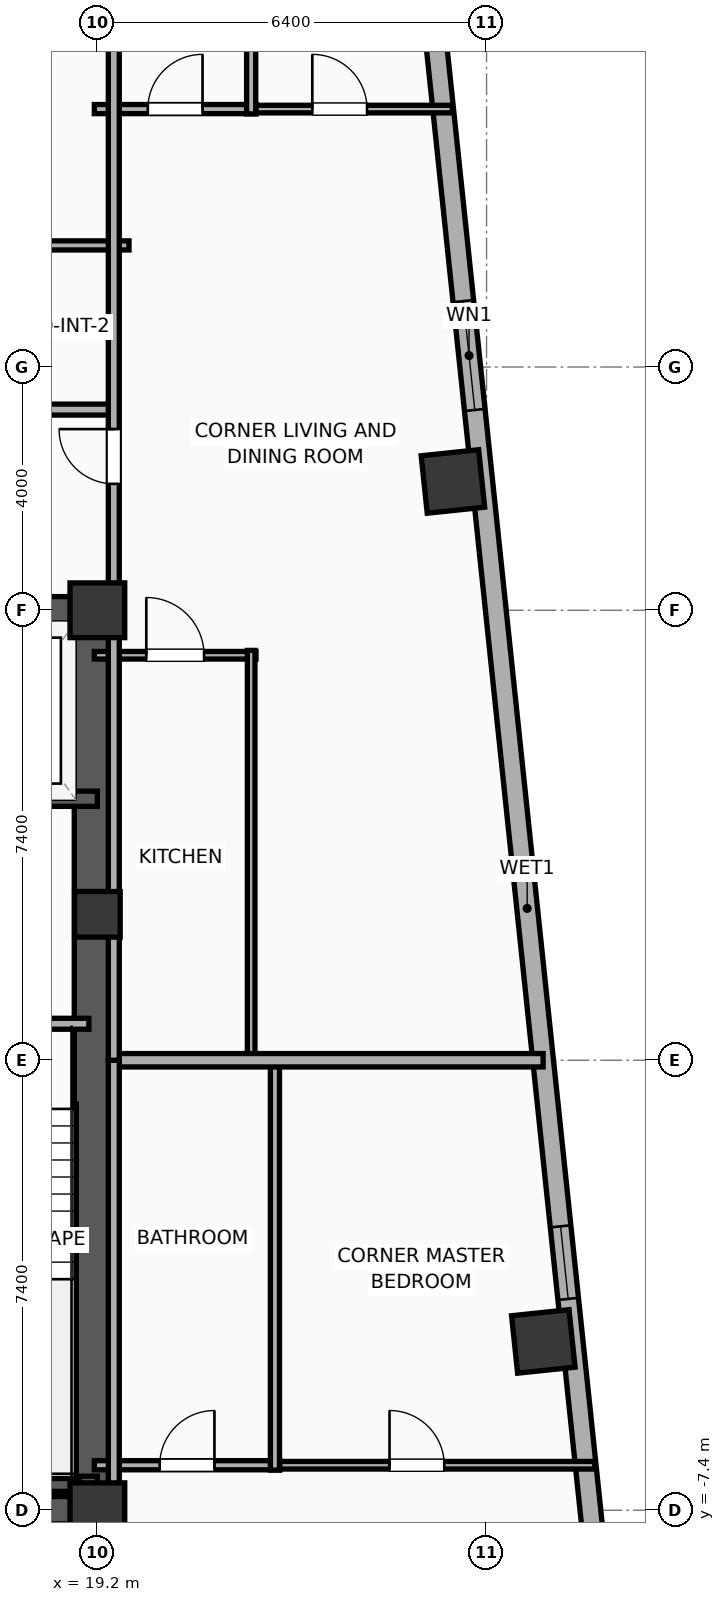
"""IFC4 building model, lengths in metres.
Left out: names, types, materials, properties, quantities, classifications, styles, units other than length and angle.
Written with IfcOpenShell. Run it as: python <this file> out.ifc"""

import sys

from ifc_helpers import new_model, si_unit, direction, frame, frame_2d, origin, origin_2d, place, context, subcontext, project, spatial, rectangle, hollow_rectangle, extrude, element, fill, save


model = new_model("IFC4")
c1 = context("Model", 3, precision=1e-05, world=origin(), true_north=direction((0.0, 1.0)))
c2 = subcontext(c1, "Body", "Model", "MODEL_VIEW")
j1 = project(units=[si_unit("LENGTHUNIT", "METRE"), si_unit("PLANEANGLEUNIT", "RADIAN")], contexts=[c1])
p1 = place(None, origin())
s1 = spatial("IfcSite", under=j1, at=p1, CompositionType="ELEMENT")
p2 = place(p1, origin())
s2 = spatial("IfcBuilding", under=s1, at=p2, CompositionType="ELEMENT")
p3 = place(p2, frame((0.0, 0.0, 148.2)))
s3 = spatial("IfcBuildingStorey", under=s2, at=p3, CompositionType="ELEMENT", Elevation=148.2)
p4 = place(p3, frame((19.2, -7.4, 0.0), z_axis=(0.0, 0.0, 1.0), x_axis=(1.0, 0.0, 0.0)))
e1 = element("IfcColumn", 1, at=p4, inside=s3, PredefinedType="COLUMN", context=c2, shape_type="SweptSolid", body=[
    extrude(rectangle(XDim=0.9, YDim=0.9, at=origin_2d()), origin(), (0.0, 0.0, 1.0), 3.9),
])
p5 = place(p3, frame((19.2, 2.4, 0.0), z_axis=(0.0, 0.0, 1.0), x_axis=(1.0, 0.0, 0.0)))
e2 = element("IfcColumn", 2, at=p5, inside=s3, PredefinedType="COLUMN", context=c2, shape_type="SweptSolid", body=[
    extrude(rectangle(XDim=0.75, YDim=0.75, at=origin_2d()), origin(), (0.0, 0.0, 1.0), 3.9),
])
p6 = place(p3, frame((19.2, 7.4, 0.0), z_axis=(0.0, 0.0, 1.0), x_axis=(1.0, 0.0, 0.0)))
e3 = element("IfcColumn", 3, at=p6, inside=s3, PredefinedType="COLUMN", context=c2, shape_type="SweptSolid", body=[
    extrude(rectangle(XDim=0.9, YDim=0.9, at=origin_2d()), origin(), (0.0, 0.0, 1.0), 3.9),
])
for number, where, z_axis, x_axis in (
    (4, (12.175, -7.4, 0.0), (0.0, 0.0, 1.0), (1.0, 0.0, 0.0)),
    (5, (12.175, 7.4, 0.0), (0.0, 0.0, 1.0), (1.0, 0.0, 0.0)),
):
    element("IfcWall", number, at=place(p3, frame(where, z_axis=z_axis, x_axis=x_axis)), inside=s3, PredefinedType="SHEAR", context=c2, shape_type="SweptSolid", body=[
        extrude(rectangle(XDim=7.25, YDim=0.45, at=frame_2d((3.625, 0.0))), origin(), (0.0, 0.0, 1.0), 3.65),
    ])
p7 = place(p3, frame((19.145, -7.4, 0.0), z_axis=(0.0, 0.0, 1.0), x_axis=(0.0, 1.0, 0.0)))
e6 = element("IfcWall", 6, at=p7, inside=s3, PredefinedType="SHEAR", context=c2, shape_type="SweptSolid", body=[
    extrude(rectangle(XDim=14.8, YDim=0.65, at=frame_2d((7.4, 0.0))), origin(), (0.0, 0.0, 1.0), 3.65),
])
p8 = place(p3, frame((15.74, -6.965, 0.0), z_axis=(0.0, 0.0, 1.0), x_axis=(1.0, 0.0, 0.0)))
e7 = element("IfcWall", 7, at=p8, inside=s3, PredefinedType="SOLIDWALL", context=c2, shape_type="SweptSolid", body=[
    extrude(rectangle(XDim=3.46, YDim=0.25, at=frame_2d((1.73, 0.0))), origin(), (0.0, 0.0, 1.0), 3.65),
])
for number, where, z_axis, x_axis in (
    (8, (26.533, -4.624, 0.0), (0.0, 0.0, 1.0), (0.995, 0.105, 0.0)),
    (9, (25.047, 9.518, 0.0), (0.0, 0.0, 1.0), (0.995, 0.105, 0.0)),
):
    element("IfcColumn", number, at=place(p3, frame(where, z_axis=z_axis, x_axis=x_axis)), inside=s3, PredefinedType="COLUMN", context=c2, shape_type="SweptSolid", body=[
        extrude(hollow_rectangle(XDim=0.95, YDim=0.95, WallThickness=0.032, at=origin_2d()), origin(), (0.0, 0.0, 1.0), 3.9),
    ])
p9 = place(p3, frame((24.534, 18.99, 0.0), z_axis=(0.0, 0.0, 1.0), x_axis=(0.104534959766, -0.994521212537, 0.0)))
e10 = element("IfcWall", 10, at=p9, inside=s3, PredefinedType="ELEMENTEDWALL", context=c2, shape_type="SweptSolid", body=[
    extrude(rectangle(XDim=33.166, YDim=0.34, at=frame_2d((16.583, 0.0))), origin(), (0.0, 0.0, 1.0), 3.65),
])
p10 = place(p9, frame((6.542, 0.0, 0.75)))
e11 = element("IfcOpeningElement", 11, at=p10, cuts=e10, PredefinedType="OPENING", context=c2, shape_type="SweptSolid", body=[
    extrude(rectangle(XDim=1.8, YDim=2.1, at=frame_2d((0.9, 1.05))), frame((0.0, 0.18, 0.0), z_axis=(0.0, -1.0, 0.0), x_axis=(1.0, 0.0, 0.0)), (0.0, 0.0, 1.0), 0.36),
])
p11 = place(p9, frame((21.84, 0.0, 0.75)))
e12 = element("IfcOpeningElement", 12, at=p11, cuts=e10, PredefinedType="OPENING", context=c2, shape_type="SweptSolid", body=[
    extrude(rectangle(XDim=1.2, YDim=2.05, at=frame_2d((0.6, 1.025))), frame((0.0, 0.18, 0.0), z_axis=(0.0, -1.0, 0.0), x_axis=(1.0, 0.0, 0.0)), (0.0, 0.0, 1.0), 0.36),
])
p12 = place(p3, frame((16.6, 4.3, 0.0), z_axis=(0.0, 0.0, 1.0), x_axis=(1.0, 0.0, 0.0)))
e13 = element("IfcWall", 13, at=p12, inside=s3, PredefinedType="SOLIDWALL", context=c2, shape_type="SweptSolid", body=[
    extrude(rectangle(XDim=2.6, YDim=0.25, at=frame_2d((1.3, 0.0))), origin(), (0.0, 0.0, 1.0), 3.65),
])
p13 = place(p3, frame((15.7, 0.6, 0.0), z_axis=(0.0, 0.0, 1.0), x_axis=(1.0, 0.0, 0.0)))
e14 = element("IfcWall", 14, at=p13, inside=s3, PredefinedType="PARTITIONING", context=c2, shape_type="SweptSolid", body=[
    extrude(rectangle(XDim=3.36, YDim=0.18, at=frame_2d((1.68, 0.0))), origin(), (0.0, 0.0, 1.0), 3.65),
])
p14 = place(p13, frame((1.155, 0.0, 0.0)))
e15 = element("IfcOpeningElement", 15, at=p14, cuts=e14, PredefinedType="OPENING", context=c2, shape_type="SweptSolid", body=[
    extrude(rectangle(XDim=1.05, YDim=2.05, at=frame_2d((0.525, 1.025))), frame((0.0, 0.1, 0.0), z_axis=(0.0, -1.0, 0.0), x_axis=(1.0, 0.0, 0.0)), (0.0, 0.0, 1.0), 0.2),
])
p15 = place(p3, frame((17.136, 13.4, 0.0), z_axis=(0.0, 0.0, 1.0), x_axis=(1.0, 0.0, 0.0)))
e16 = element("IfcWall", 16, at=p15, inside=s3, PredefinedType="PLUMBINGWALL", context=c2, shape_type="SweptSolid", body=[
    extrude(rectangle(XDim=2.584, YDim=0.15, at=frame_2d((1.292, 0.0))), origin(), (0.0, 0.0, 1.0), 3.65),
])
p16 = place(p3, frame((8.08, 10.7, 0.0), z_axis=(0.0, 0.0, 1.0), x_axis=(1.0, 0.0, 0.0)))
e17 = element("IfcWall", 17, at=p16, inside=s3, PredefinedType="PARTITIONING", context=c2, shape_type="SweptSolid", body=[
    extrude(rectangle(XDim=11.42, YDim=0.18, at=frame_2d((5.71, 0.0))), origin(), (0.0, 0.0, 1.0), 3.65),
])
p17 = place(p16, frame((2.562, 0.0, 0.0)))
e18 = element("IfcOpeningElement", 18, at=p17, cuts=e17, PredefinedType="OPENING", context=c2, shape_type="SweptSolid", body=[
    extrude(rectangle(XDim=0.9, YDim=2.05, at=frame_2d((0.45, 1.025))), frame((0.0, 0.1, 0.0), z_axis=(0.0, -1.0, 0.0), x_axis=(1.0, 0.0, 0.0)), (0.0, 0.0, 1.0), 0.2),
])
p18 = place(p16, frame((6.853, 0.0, 0.0)))
e19 = element("IfcOpeningElement", 19, at=p18, cuts=e17, PredefinedType="OPENING", context=c2, shape_type="SweptSolid", body=[
    extrude(rectangle(XDim=1.15, YDim=2.05, at=frame_2d((0.575, 1.025))), frame((0.0, 0.1, 0.0), z_axis=(0.0, -1.0, 0.0), x_axis=(1.0, 0.0, 0.0)), (0.0, 0.0, 1.0), 0.2),
])
p19 = place(p3, frame((22.06, -6.66, 0.0), z_axis=(0.0, 0.0, 1.0), x_axis=(1.0, 0.0, 0.0)))
e20 = element("IfcWall", 20, at=p19, inside=s3, PredefinedType="PARTITIONING", context=c2, shape_type="SweptSolid", body=[
    extrude(rectangle(XDim=5.321, YDim=0.125, at=frame_2d((2.661, 0.0))), origin(), (0.0, 0.0, 1.0), 3.65),
])
p20 = place(p19, frame((1.945, 0.0, 0.0)))
e21 = element("IfcOpeningElement", 21, at=p20, cuts=e20, PredefinedType="OPENING", context=c2, shape_type="SweptSolid", body=[
    extrude(rectangle(XDim=0.9, YDim=2.05, at=frame_2d((0.45, 1.025))), frame((0.0, 0.073, 0.0), z_axis=(0.0, -1.0, 0.0), x_axis=(1.0, 0.0, 0.0)), (0.0, 0.0, 1.0), 0.145),
])
p21 = place(p3, frame((19.15, -6.66, 0.0), z_axis=(0.0, 0.0, 1.0), x_axis=(1.0, 0.0, 0.0)))
e22 = element("IfcWall", 22, at=p21, inside=s3, PredefinedType="PLUMBINGWALL", context=c2, shape_type="SweptSolid", body=[
    extrude(rectangle(XDim=3.05, YDim=0.15, at=frame_2d((1.525, 0.0))), origin(), (0.0, 0.0, 1.0), 3.04),
])
p22 = place(p21, frame((1.075, 0.0, 0.0)))
e23 = element("IfcOpeningElement", 23, at=p22, cuts=e22, PredefinedType="OPENING", context=c2, shape_type="SweptSolid", body=[
    extrude(rectangle(XDim=0.9, YDim=2.05, at=frame_2d((0.45, 1.025))), frame((0.0, 0.085, 0.0), z_axis=(0.0, -1.0, 0.0), x_axis=(1.0, 0.0, 0.0)), (0.0, 0.0, 1.0), 0.17),
])
p23 = place(p3, frame((22.12, -6.74, 0.0), z_axis=(0.0, 0.0, 1.0), x_axis=(0.0, 1.0, 0.0)))
e24 = element("IfcWall", 24, at=p23, inside=s3, PredefinedType="PLUMBINGWALL", context=c2, shape_type="SweptSolid", body=[
    extrude(rectangle(XDim=6.72, YDim=0.15, at=frame_2d((3.36, 0.0))), origin(), (0.0, 0.0, 1.0), 3.65),
])
p24 = place(p3, frame((21.669, 15.642, 0.0), z_axis=(0.0, 0.0, 1.0), x_axis=(1.0, 0.0, 0.0)))
e25 = element("IfcWall", 25, at=p24, inside=s3, PredefinedType="PARTITIONING", context=c2, shape_type="SweptSolid", body=[
    extrude(rectangle(XDim=3.368, YDim=0.125, at=frame_2d((1.684, 0.0))), origin(), (0.0, 0.0, 1.0), 3.65),
])
p25 = place(p24, frame((1.066, 0.0, 0.0)))
e26 = element("IfcOpeningElement", 26, at=p25, cuts=e25, PredefinedType="OPENING", context=c2, shape_type="SweptSolid", body=[
    extrude(rectangle(XDim=0.9, YDim=2.05, at=frame_2d((0.45, 1.025))), frame((0.0, 0.073, 0.0), z_axis=(0.0, -1.0, 0.0), x_axis=(1.0, 0.0, 0.0)), (0.0, 0.0, 1.0), 0.145),
])
p26 = place(p3, frame((19.15, 6.66, 0.0), z_axis=(0.0, 0.0, 1.0), x_axis=(1.0, 0.0, 0.0)))
e27 = element("IfcWall", 27, at=p26, inside=s3, PredefinedType="PARTITIONING", context=c2, shape_type="SweptSolid", body=[
    extrude(rectangle(XDim=2.659, YDim=0.125, at=frame_2d((1.33, 0.0))), origin(), (0.0, 0.0, 1.0), 3.65),
])
p27 = place(p26, frame((0.854, 0.0, 0.0)))
e28 = element("IfcOpeningElement", 28, at=p27, cuts=e27, PredefinedType="OPENING", context=c2, shape_type="SweptSolid", body=[
    extrude(rectangle(XDim=0.95, YDim=2.05, at=frame_2d((0.475, 1.025))), frame((0.0, 0.073, 0.0), z_axis=(0.0, -1.0, 0.0), x_axis=(1.0, 0.0, 0.0)), (0.0, 0.0, 1.0), 0.145),
])
p28 = place(p3, frame((19.15, 15.642, 0.0), z_axis=(0.0, 0.0, 1.0), x_axis=(1.0, 0.0, 0.0)))
e29 = element("IfcWall", 29, at=p28, inside=s3, PredefinedType="PLUMBINGWALL", context=c2, shape_type="SweptSolid", body=[
    extrude(rectangle(XDim=2.659, YDim=0.15, at=frame_2d((1.33, 0.0))), origin(), (0.0, 0.0, 1.0), 3.65),
])
p29 = place(p28, frame((0.879, 0.0, 0.0)))
e30 = element("IfcOpeningElement", 30, at=p29, cuts=e29, PredefinedType="OPENING", context=c2, shape_type="SweptSolid", body=[
    extrude(rectangle(XDim=0.9, YDim=2.05, at=frame_2d((0.45, 1.025))), frame((0.0, 0.085, 0.0), z_axis=(0.0, -1.0, 0.0), x_axis=(1.0, 0.0, 0.0)), (0.0, 0.0, 1.0), 0.17),
])
p30 = place(p3, frame((21.729, 0.02, 0.0), z_axis=(0.0, 0.0, 1.0), x_axis=(0.0, 1.0, 0.0)))
e31 = element("IfcWall", 31, at=p30, inside=s3, PredefinedType="PARTITIONING", context=c2, shape_type="SweptSolid", body=[
    extrude(rectangle(XDim=6.72, YDim=0.125, at=frame_2d((3.36, 0.0))), origin(), (0.0, 0.0, 1.0), 3.65),
])
p31 = place(p3, frame((21.729, 15.562, 0.0), z_axis=(0.0, 0.0, 1.0), x_axis=(0.0, 1.0, 0.0)))
e32 = element("IfcWall", 32, at=p31, inside=s3, PredefinedType="PLUMBINGWALL", context=c2, shape_type="SweptSolid", body=[
    extrude(rectangle(XDim=6.713, YDim=0.15, at=frame_2d((3.357, 0.0))), origin(), (0.0, 0.0, 1.0), 3.04),
])
p32 = place(p3, frame((19.47, 0.0, 0.0), z_axis=(0.0, 0.0, 1.0), x_axis=(1.0, 0.0, 0.0)))
e33 = element("IfcWall", 33, at=p32, inside=s3, PredefinedType="PARTITIONING", context=c2, shape_type="SweptSolid", body=[
    extrude(rectangle(XDim=7.06, YDim=0.22, at=frame_2d((3.53, 0.0))), origin(), (0.0, 0.0, 1.0), 3.65),
])
p33 = place(p3, frame((19.47, -18.559, 0.0), z_axis=(0.0, 0.0, 1.0), x_axis=(0.0, 1.0, 0.0)))
e34 = element("IfcWall", 34, at=p33, inside=s3, PredefinedType="PARTITIONING", context=c2, shape_type="SweptSolid", body=[
    extrude(rectangle(XDim=18.559, YDim=0.18, at=frame_2d((9.279, 0.0))), origin(), (0.0, 0.0, 1.0), 3.65),
])
p34 = place(p33, frame((8.178, 0.0, 0.0)))
e35 = element("IfcOpeningElement", 35, at=p34, cuts=e34, PredefinedType="OPENING", context=c2, shape_type="SweptSolid", body=[
    extrude(rectangle(XDim=0.9, YDim=2.05, at=frame_2d((0.45, 1.025))), frame((0.0, 0.1, 0.0), z_axis=(0.0, -1.0, 0.0), x_axis=(1.0, 0.0, 0.0)), (0.0, 0.0, 1.0), 0.2),
])
p35 = place(p3, frame((19.47, 0.0, 0.0), z_axis=(0.0, 0.0, 1.0), x_axis=(0.0, 1.0, 0.0)))
e36 = element("IfcWall", 36, at=p35, inside=s3, PredefinedType="PARTITIONING", context=c2, shape_type="SweptSolid", body=[
    extrude(rectangle(XDim=22.124, YDim=0.18, at=frame_2d((11.062, 0.0))), origin(), (0.0, 0.0, 1.0), 3.04),
])
p36 = place(p35, frame((9.479, 0.0, 0.0)))
e37 = element("IfcOpeningElement", 37, at=p36, cuts=e36, PredefinedType="OPENING", context=c2, shape_type="SweptSolid", body=[
    extrude(rectangle(XDim=0.9, YDim=2.05, at=frame_2d((0.45, 1.025))), frame((0.0, 0.1, 0.0), z_axis=(0.0, -1.0, 0.0), x_axis=(1.0, 0.0, 0.0)), (0.0, 0.0, 1.0), 0.2),
])
p37 = place(p10, origin())
e38 = element("IfcWindow", 38, at=p37, inside=s3, PartitioningType="SINGLE_PANEL", PredefinedType="WINDOW", context=c2, shape_type="SweptSolid", body=[
    extrude(rectangle(XDim=1.8, YDim=2.1, at=frame_2d((0.9, 1.05))), frame((0.0, 0.03, 0.0), z_axis=(0.0, -1.0, 0.0), x_axis=(1.0, 0.0, 0.0)), (0.0, 0.0, 1.0), 0.06),
])
fill(e11, e38)
p38 = place(p11, origin())
e39 = element("IfcWindow", 39, at=p38, inside=s3, PartitioningType="SINGLE_PANEL", PredefinedType="WINDOW", context=c2, shape_type="SweptSolid", body=[
    extrude(rectangle(XDim=1.2, YDim=2.05, at=frame_2d((0.6, 1.025))), frame((0.0, 0.03, 0.0), z_axis=(0.0, -1.0, 0.0), x_axis=(1.0, 0.0, 0.0)), (0.0, 0.0, 1.0), 0.06),
])
fill(e12, e39)
p39 = place(p20, origin())
e40 = element("IfcDoor", 40, at=p39, inside=s3, OperationType="SINGLE_SWING_LEFT", PredefinedType="DOOR", context=c2, shape_type="SweptSolid", body=[
    extrude(rectangle(XDim=0.9, YDim=2.05, at=frame_2d((0.45, 1.025))), frame((0.0, 0.025, 0.0), z_axis=(0.0, -1.0, 0.0), x_axis=(1.0, 0.0, 0.0)), (0.0, 0.0, 1.0), 0.05),
])
fill(e21, e40)
p40 = place(p22, origin())
e41 = element("IfcDoor", 41, at=p40, inside=s3, OperationType="SINGLE_SWING_RIGHT", PredefinedType="DOOR", context=c2, shape_type="SweptSolid", body=[
    extrude(rectangle(XDim=0.9, YDim=2.05, at=frame_2d((0.45, 1.025))), frame((0.0, 0.025, 0.0), z_axis=(0.0, -1.0, 0.0), x_axis=(1.0, 0.0, 0.0)), (0.0, 0.0, 1.0), 0.05),
])
fill(e23, e41)
p41 = place(p25, origin())
e42 = element("IfcDoor", 42, at=p41, inside=s3, OperationType="SINGLE_SWING_LEFT", PredefinedType="DOOR", context=c2, shape_type="SweptSolid", body=[
    extrude(rectangle(XDim=0.9, YDim=2.05, at=frame_2d((0.45, 1.025))), frame((0.0, 0.025, 0.0), z_axis=(0.0, -1.0, 0.0), x_axis=(1.0, 0.0, 0.0)), (0.0, 0.0, 1.0), 0.05),
])
fill(e26, e42)
p42 = place(p27, origin())
e43 = element("IfcDoor", 43, at=p42, inside=s3, OperationType="SINGLE_SWING_LEFT", PredefinedType="DOOR", context=c2, shape_type="SweptSolid", body=[
    extrude(rectangle(XDim=0.95, YDim=2.05, at=frame_2d((0.475, 1.025))), frame((0.0, 0.025, 0.0), z_axis=(0.0, -1.0, 0.0), x_axis=(1.0, 0.0, 0.0)), (0.0, 0.0, 1.0), 0.05),
])
fill(e28, e43)
p43 = place(p29, origin())
e44 = element("IfcDoor", 44, at=p43, inside=s3, OperationType="SINGLE_SWING_RIGHT", PredefinedType="DOOR", context=c2, shape_type="SweptSolid", body=[
    extrude(rectangle(XDim=0.9, YDim=2.05, at=frame_2d((0.45, 1.025))), frame((0.0, 0.025, 0.0), z_axis=(0.0, -1.0, 0.0), x_axis=(1.0, 0.0, 0.0)), (0.0, 0.0, 1.0), 0.05),
])
fill(e30, e44)
p44 = place(p36, origin())
e45 = element("IfcDoor", 45, at=p44, inside=s3, OperationType="SINGLE_SWING_RIGHT", PredefinedType="DOOR", context=c2, shape_type="SweptSolid", body=[
    extrude(rectangle(XDim=0.9, YDim=2.05, at=frame_2d((0.45, 1.025))), frame((0.0, 0.025, 0.0), z_axis=(0.0, -1.0, 0.0), x_axis=(1.0, 0.0, 0.0)), (0.0, 0.0, 1.0), 0.05),
])
fill(e37, e45)
save(model, sys.argv[1])
